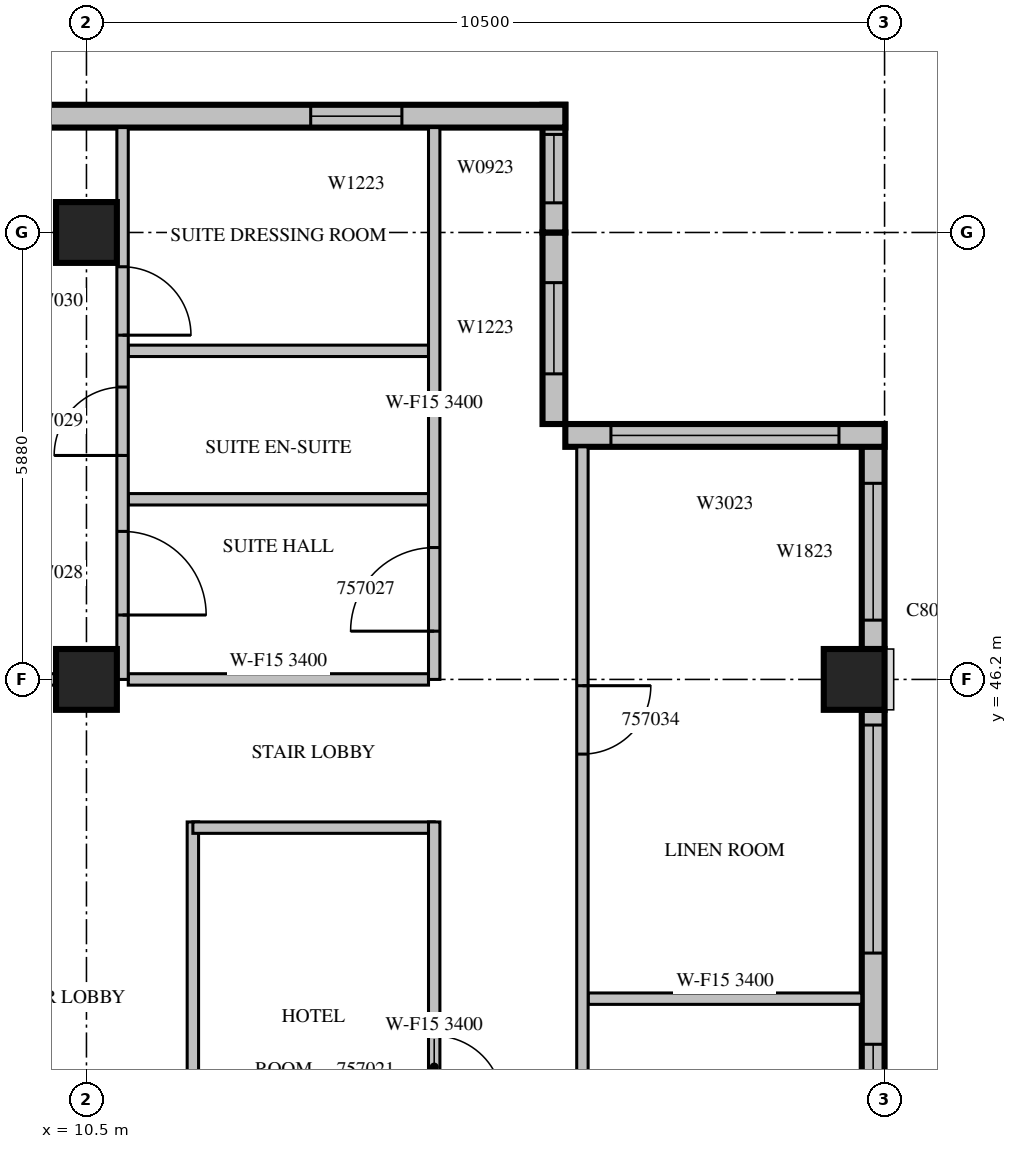
"""IFC4 building model, lengths in metres.
Left out: names, types, materials, properties, quantities, classifications, styles, units other than length and angle.
Written with IfcOpenShell. Run it as: python <this file> out.ifc"""

import sys

from ifc_helpers import new_model, si_unit, direction, frame, frame_2d, origin, origin_2d, place, context, subcontext, project, spatial, rectangle, extrude, source, transform, mapped, element, fill, save


model = new_model("IFC4")
c1 = context("Model", 3, precision=1e-05, world=origin(), true_north=direction((0.0, 1.0)))
c2 = subcontext(c1, "Body", "Model", "MODEL_VIEW")
j1 = project(units=[si_unit("LENGTHUNIT", "METRE"), si_unit("PLANEANGLEUNIT", "RADIAN")], contexts=[c1])
p1 = place(None, origin())
s1 = spatial("IfcSite", under=j1, at=p1, CompositionType="ELEMENT")
p2 = place(p1, origin())
s2 = spatial("IfcBuilding", under=s1, at=p2, CompositionType="ELEMENT")
p3 = place(p2, frame((0.0, 0.0, 250.0)))
s3 = spatial("IfcBuildingStorey", under=s2, at=p3, CompositionType="ELEMENT", Elevation=250.0)
m1 = source(origin(), c2, "Body", "SweptSolid", [
    extrude(rectangle(XDim=0.8, YDim=0.8, at=origin_2d()), origin(), (0.0, 0.0, 1.0), 3.8),
])
for number, where, z_axis, x_axis in (
    (1, (10.5, 46.2, 0.0), (0.0, 0.0, 1.0), (1.0, 0.0, 0.0)),
    (2, (20.6, 46.2, 0.0), (0.0, 0.0, 1.0), (1.0, 0.0, 0.0)),
    (3, (10.5, 52.08, 0.0), (0.0, 0.0, 1.0), (1.0, 0.0, 0.0)),
):
    element("IfcColumn", number, at=place(p3, frame(where, z_axis=z_axis, x_axis=x_axis)), inside=s3, PredefinedType="COLUMN", context=c2, shape_type="MappedRepresentation", body=[
        mapped(m1, transform((0.0, 0.0, 0.0), scale=1.0)),
    ])
m2 = source(origin(), c2, "Body", "SweptSolid", [
    extrude(rectangle(XDim=7.6, YDim=0.3, at=frame_2d((3.8, 0.0))), origin(), (0.0, 0.0, 1.0), 3.4),
])
p4 = place(p3, frame((20.85, 38.2, 0.0), z_axis=(0.0, 0.0, 1.0), x_axis=(0.0, 1.0, 0.0)))
e4 = element("IfcWall", 4, at=p4, inside=s3, PredefinedType="STANDARD", context=c2, shape_type="MappedRepresentation", body=[
    mapped(m2, transform((0.0, 0.0, 0.0), scale=1.0)),
])
m3 = source(origin(), c2, "Body", "SweptSolid", [
    extrude(rectangle(XDim=3.0, YDim=2.3, at=frame_2d((1.5, 1.15))), frame((0.0, 0.16, 0.0), z_axis=(0.0, -1.0, 0.0), x_axis=(1.0, 0.0, 0.0)), (0.0, 0.0, 1.0), 0.32),
])
p5 = place(p4, frame((0.2, 0.0, 0.6)))
e5 = element("IfcOpeningElement", 5, at=p5, cuts=e4, PredefinedType="OPENING", context=c2, shape_type="MappedRepresentation", body=[
    mapped(m3, transform((0.0, 0.0, 0.0), scale=1.0)),
])
p6 = place(p4, frame((4.4, 0.0, 0.6)))
e6 = element("IfcOpeningElement", 6, at=p6, cuts=e4, PredefinedType="OPENING", context=c2, shape_type="MappedRepresentation", body=[
    mapped(m3, transform((0.0, 0.0, 0.0), scale=1.0)),
])
m4 = source(origin(), c2, "Body", "SweptSolid", [
    extrude(rectangle(XDim=2.96, YDim=0.3, at=frame_2d((1.48, 0.0))), origin(), (0.0, 0.0, 1.0), 3.4),
])
p7 = place(p3, frame((20.85, 46.6, 0.0), z_axis=(0.0, 0.0, 1.0), x_axis=(0.0, 1.0, 0.0)))
e7 = element("IfcWall", 7, at=p7, inside=s3, PredefinedType="STANDARD", context=c2, shape_type="MappedRepresentation", body=[
    mapped(m4, transform((0.0, 0.0, 0.0), scale=1.0)),
])
m5 = source(origin(), c2, "Body", "SweptSolid", [
    extrude(rectangle(XDim=1.8, YDim=2.3, at=frame_2d((0.9, 1.15))), frame((0.0, 0.16, 0.0), z_axis=(0.0, -1.0, 0.0), x_axis=(1.0, 0.0, 0.0)), (0.0, 0.0, 1.0), 0.32),
])
p8 = place(p7, frame((0.38, 0.0, 0.6)))
e8 = element("IfcOpeningElement", 8, at=p8, cuts=e7, PredefinedType="OPENING", context=c2, shape_type="MappedRepresentation", body=[
    mapped(m5, transform((0.0, 0.0, 0.0), scale=1.0)),
])
m6 = source(origin(), c2, "Body", "SweptSolid", [
    extrude(rectangle(XDim=4.2, YDim=0.3, at=frame_2d((2.1, 0.0))), origin(), (0.0, 0.0, 1.0), 3.4),
])
p9 = place(p3, frame((21.0, 49.41, 0.0), z_axis=(0.0, 0.0, 1.0), x_axis=(-1.0, 0.0, 0.0)))
e9 = element("IfcWall", 9, at=p9, inside=s3, PredefinedType="STANDARD", context=c2, shape_type="MappedRepresentation", body=[
    mapped(m6, transform((0.0, 0.0, 0.0), scale=1.0)),
])
p10 = place(p9, frame((0.6, 0.0, 0.6)))
e10 = element("IfcOpeningElement", 10, at=p10, cuts=e9, PredefinedType="OPENING", context=c2, shape_type="MappedRepresentation", body=[
    mapped(m3, transform((0.0, 0.0, 0.0), scale=1.0)),
])
m7 = source(origin(), c2, "Body", "SweptSolid", [
    extrude(rectangle(XDim=2.52, YDim=0.3, at=frame_2d((1.26, 0.0))), origin(), (0.0, 0.0, 1.0), 3.4),
])
p11 = place(p3, frame((16.65, 49.56, 0.0), z_axis=(0.0, 0.0, 1.0), x_axis=(0.0, 1.0, 0.0)))
e11 = element("IfcWall", 11, at=p11, inside=s3, PredefinedType="STANDARD", context=c2, shape_type="MappedRepresentation", body=[
    mapped(m7, transform((0.0, 0.0, 0.0), scale=1.0)),
])
m8 = source(origin(), c2, "Body", "SweptSolid", [
    extrude(rectangle(XDim=1.2, YDim=2.3, at=frame_2d((0.6, 1.15))), frame((0.0, 0.16, 0.0), z_axis=(0.0, -1.0, 0.0), x_axis=(1.0, 0.0, 0.0)), (0.0, 0.0, 1.0), 0.32),
])
p12 = place(p11, frame((0.66, 0.0, 0.6)))
e12 = element("IfcOpeningElement", 12, at=p12, cuts=e11, PredefinedType="OPENING", context=c2, shape_type="MappedRepresentation", body=[
    mapped(m8, transform((0.0, 0.0, 0.0), scale=1.0)),
])
m9 = source(origin(), c2, "Body", "SweptSolid", [
    extrude(rectangle(XDim=1.68, YDim=0.3, at=frame_2d((0.84, 0.0))), origin(), (0.0, 0.0, 1.0), 3.4),
])
p13 = place(p3, frame((16.65, 52.08, 0.0), z_axis=(0.0, 0.0, 1.0), x_axis=(0.0, 1.0, 0.0)))
e13 = element("IfcWall", 13, at=p13, inside=s3, PredefinedType="STANDARD", context=c2, shape_type="MappedRepresentation", body=[
    mapped(m9, transform((0.0, 0.0, 0.0), scale=1.0)),
])
m10 = source(origin(), c2, "Body", "SweptSolid", [
    extrude(rectangle(XDim=0.9, YDim=2.3, at=frame_2d((0.45, 1.15))), frame((0.0, 0.16, 0.0), z_axis=(0.0, -1.0, 0.0), x_axis=(1.0, 0.0, 0.0)), (0.0, 0.0, 1.0), 0.32),
])
p14 = place(p13, frame((0.39, 0.0, 0.6)))
e14 = element("IfcOpeningElement", 14, at=p14, cuts=e13, PredefinedType="OPENING", context=c2, shape_type="MappedRepresentation", body=[
    mapped(m10, transform((0.0, 0.0, 0.0), scale=1.0)),
])
m11 = source(origin(), c2, "Body", "SweptSolid", [
    extrude(rectangle(XDim=10.5, YDim=0.3, at=frame_2d((5.25, 0.0))), origin(), (0.0, 0.0, 1.0), 3.4),
])
p15 = place(p3, frame((16.8, 53.61, 0.0), z_axis=(0.0, 0.0, 1.0), x_axis=(-1.0, 0.0, 0.0)))
e15 = element("IfcWall", 15, at=p15, inside=s3, PredefinedType="STANDARD", context=c2, shape_type="MappedRepresentation", body=[
    mapped(m11, transform((0.0, 0.0, 0.0), scale=1.0)),
])
p16 = place(p15, frame((2.15, 0.0, 0.6)))
e16 = element("IfcOpeningElement", 16, at=p16, cuts=e15, PredefinedType="OPENING", context=c2, shape_type="MappedRepresentation", body=[
    mapped(m8, transform((0.0, 0.0, 0.0), scale=1.0)),
])
p17 = place(p15, frame((8.025, 0.0, 0.6)))
e17 = element("IfcOpeningElement", 17, at=p17, cuts=e15, PredefinedType="OPENING", context=c2, shape_type="MappedRepresentation", body=[
    mapped(m5, transform((0.0, 0.0, 0.0), scale=1.0)),
])
m12 = source(origin(), c2, "Body", "SweptSolid", [
    extrude(rectangle(XDim=6.45, YDim=0.15, at=frame_2d((3.225, 0.0))), origin(), (0.0, 0.0, 1.0), 3.4),
])
p18 = place(p3, frame((11.9, 44.325, 0.0), z_axis=(0.0, 0.0, 1.0), x_axis=(0.0, -1.0, 0.0)))
e18 = element("IfcWall", 18, at=p18, inside=s3, PredefinedType="PARTITIONING", context=c2, shape_type="MappedRepresentation", body=[
    mapped(m12, transform((0.0, 0.0, 0.0), scale=1.0)),
])
m13 = source(origin(), c2, "Body", "SweptSolid", [
    extrude(rectangle(XDim=3.175, YDim=0.15, at=frame_2d((1.587, 0.0))), origin(), (0.0, 0.0, 1.0), 3.4),
])
p19 = place(p3, frame((15.075, 44.25, 0.0), z_axis=(0.0, 0.0, 1.0), x_axis=(-1.0, 0.0, 0.0)))
e19 = element("IfcWall", 19, at=p19, inside=s3, PredefinedType="PARTITIONING", context=c2, shape_type="MappedRepresentation", body=[
    mapped(m13, transform((0.0, 0.0, 0.0), scale=1.0)),
])
p20 = place(p3, frame((15.075, 37.875, 0.0), z_axis=(0.0, 0.0, 1.0), x_axis=(0.0, 1.0, 0.0)))
e20 = element("IfcWall", 20, at=p20, inside=s3, PredefinedType="PARTITIONING", context=c2, shape_type="MappedRepresentation", body=[
    mapped(m12, transform((0.0, 0.0, 0.0), scale=1.0)),
])
m14 = source(origin(), c2, "Body", "SweptSolid", [
    extrude(rectangle(XDim=0.9, YDim=2.1, at=frame_2d((0.45, 1.05))), frame((0.0, 0.085, 0.0), z_axis=(0.0, -1.0, 0.0), x_axis=(1.0, 0.0, 0.0)), (0.0, 0.0, 1.0), 0.17),
])
p21 = place(p20, frame((2.737, 0.0, 0.0)))
e21 = element("IfcOpeningElement", 21, at=p21, cuts=e20, PredefinedType="OPENING", context=c2, shape_type="MappedRepresentation", body=[
    mapped(m14, transform((0.0, 0.0, 0.0), scale=1.0)),
])
m15 = source(origin(), c2, "Body", "SweptSolid", [
    extrude(rectangle(XDim=3.95, YDim=0.15, at=frame_2d((1.975, 0.0))), origin(), (0.0, 0.0, 1.0), 3.4),
])
for number, where, z_axis, x_axis in (
    (22, (15.0, 48.57, 0.0), (0.0, 0.0, 1.0), (-1.0, 0.0, 0.0)),
    (23, (15.0, 50.523, 0.0), (0.0, 0.0, 1.0), (-1.0, 0.0, 0.0)),
):
    element("IfcWall", number, at=place(p3, frame(where, z_axis=z_axis, x_axis=x_axis)), inside=s3, PredefinedType="PARTITIONING", context=c2, shape_type="MappedRepresentation", body=[
        mapped(m15, transform((0.0, 0.0, 0.0), scale=1.0)),
    ])
m16 = source(origin(), c2, "Body", "SweptSolid", [
    extrude(rectangle(XDim=3.596, YDim=0.15, at=frame_2d((1.798, 0.0))), origin(), (0.0, 0.0, 1.0), 3.4),
])
p22 = place(p3, frame((10.101, 46.2, 0.0), z_axis=(0.0, 0.0, 1.0), x_axis=(-1.0, 0.0, 0.0)))
e24 = element("IfcWall", 24, at=p22, inside=s3, PredefinedType="PARTITIONING", context=c2, shape_type="MappedRepresentation", body=[
    mapped(m16, transform((0.0, 0.0, 0.0), scale=1.0)),
])
p23 = place(p3, frame((15.0, 46.2, 0.0), z_axis=(0.0, 0.0, 1.0), x_axis=(-1.0, 0.0, 0.0)))
e25 = element("IfcWall", 25, at=p23, inside=s3, PredefinedType="PARTITIONING", context=c2, shape_type="MappedRepresentation", body=[
    mapped(m15, transform((0.0, 0.0, 0.0), scale=1.0)),
])
m17 = source(origin(), c2, "Body", "SweptSolid", [
    extrude(rectangle(XDim=7.26, YDim=0.15, at=frame_2d((3.63, 0.0))), origin(), (0.0, 0.0, 1.0), 3.4),
])
p24 = place(p3, frame((10.975, 46.2, 0.0), z_axis=(0.0, 0.0, 1.0), x_axis=(0.0, 1.0, 0.0)))
e26 = element("IfcWall", 26, at=p24, inside=s3, PredefinedType="PARTITIONING", context=c2, shape_type="MappedRepresentation", body=[
    mapped(m17, transform((0.0, 0.0, 0.0), scale=1.0)),
])
m18 = source(origin(), c2, "Body", "SweptSolid", [
    extrude(rectangle(XDim=1.1, YDim=2.1, at=frame_2d((0.55, 1.05))), frame((0.0, 0.085, 0.0), z_axis=(0.0, -1.0, 0.0), x_axis=(1.0, 0.0, 0.0)), (0.0, 0.0, 1.0), 0.17),
])
p25 = place(p24, frame((0.847, 0.0, 0.0)))
e27 = element("IfcOpeningElement", 27, at=p25, cuts=e26, PredefinedType="OPENING", context=c2, shape_type="MappedRepresentation", body=[
    mapped(m18, transform((0.0, 0.0, 0.0), scale=1.0)),
])
p26 = place(p24, frame((2.946, 0.0, 0.0)))
e28 = element("IfcOpeningElement", 28, at=p26, cuts=e26, PredefinedType="OPENING", context=c2, shape_type="MappedRepresentation", body=[
    mapped(m14, transform((0.0, 0.0, 0.0), scale=1.0)),
])
p27 = place(p24, frame((4.529, 0.0, 0.0)))
e29 = element("IfcOpeningElement", 29, at=p27, cuts=e26, PredefinedType="OPENING", context=c2, shape_type="MappedRepresentation", body=[
    mapped(m14, transform((0.0, 0.0, 0.0), scale=1.0)),
])
m19 = source(origin(), c2, "Body", "SweptSolid", [
    extrude(rectangle(XDim=3.6, YDim=0.15, at=frame_2d((1.8, 0.0))), origin(), (0.0, 0.0, 1.0), 3.4),
])
p28 = place(p3, frame((20.7, 42.0, 0.0), z_axis=(0.0, 0.0, 1.0), x_axis=(-1.0, 0.0, 0.0)))
e30 = element("IfcWall", 30, at=p28, inside=s3, PredefinedType="PARTITIONING", context=c2, shape_type="MappedRepresentation", body=[
    mapped(m19, transform((0.0, 0.0, 0.0), scale=1.0)),
])
p29 = place(p3, frame((15.075, 46.2, 0.0), z_axis=(0.0, 0.0, 1.0), x_axis=(0.0, 1.0, 0.0)))
e31 = element("IfcWall", 31, at=p29, inside=s3, PredefinedType="PARTITIONING", context=c2, shape_type="MappedRepresentation", body=[
    mapped(m17, transform((0.0, 0.0, 0.0), scale=1.0)),
])
p30 = place(p29, frame((0.635, 0.0, 0.0)))
e32 = element("IfcOpeningElement", 32, at=p30, cuts=e31, PredefinedType="OPENING", context=c2, shape_type="MappedRepresentation", body=[
    mapped(m18, transform((0.0, 0.0, 0.0), scale=1.0)),
])
m20 = source(origin(), c2, "Body", "SweptSolid", [
    extrude(rectangle(XDim=19.86, YDim=0.15, at=frame_2d((9.93, 0.0))), origin(), (0.0, 0.0, 1.0), 2.9),
])
p31 = place(p3, frame((17.025, 49.26, 0.0), z_axis=(0.0, 0.0, 1.0), x_axis=(0.0, -1.0, 0.0)))
e33 = element("IfcWall", 33, at=p31, inside=s3, PredefinedType="PARTITIONING", context=c2, shape_type="MappedRepresentation", body=[
    mapped(m20, transform((0.0, 0.0, 0.0), scale=1.0)),
])
p32 = place(p31, frame((18.528, 0.0, 0.0)))
e34 = element("IfcOpeningElement", 34, at=p32, cuts=e33, PredefinedType="OPENING", context=c2, shape_type="MappedRepresentation", body=[
    mapped(m14, transform((0.0, 0.0, 0.0), scale=1.0)),
])
p33 = place(p31, frame((16.428, 0.0, 0.0)))
e35 = element("IfcOpeningElement", 35, at=p33, cuts=e33, PredefinedType="OPENING", context=c2, shape_type="MappedRepresentation", body=[
    mapped(m14, transform((0.0, 0.0, 0.0), scale=1.0)),
])
m21 = source(origin(), c2, "Body", "SweptSolid", [
    extrude(rectangle(XDim=1.2, YDim=2.1, at=frame_2d((0.6, 1.05))), frame((0.0, 0.085, 0.0), z_axis=(0.0, -1.0, 0.0), x_axis=(1.0, 0.0, 0.0)), (0.0, 0.0, 1.0), 0.17),
])
p34 = place(p31, frame((10.86, 0.0, 0.0)))
e36 = element("IfcOpeningElement", 36, at=p34, cuts=e33, PredefinedType="OPENING", context=c2, shape_type="MappedRepresentation", body=[
    mapped(m21, transform((0.0, 0.0, 0.0), scale=1.0)),
])
p35 = place(p31, frame((3.143, 0.0, 0.0)))
e37 = element("IfcOpeningElement", 37, at=p35, cuts=e33, PredefinedType="OPENING", context=c2, shape_type="MappedRepresentation", body=[
    mapped(m14, transform((0.0, 0.0, 0.0), scale=1.0)),
])
m22 = source(origin(), c2, "Body", "SweptSolid", [
    extrude(rectangle(XDim=3.0, YDim=2.3, at=frame_2d((1.5, 1.15))), frame((0.0, 0.03, 0.0), z_axis=(0.0, -1.0, 0.0), x_axis=(1.0, 0.0, 0.0)), (0.0, 0.0, 1.0), 0.06),
])
p36 = place(p5, origin())
e38 = element("IfcWindow", 38, at=p36, inside=s3, PartitioningType="SINGLE_PANEL", PredefinedType="WINDOW", context=c2, shape_type="MappedRepresentation", body=[
    mapped(m22, transform((0.0, 0.0, 0.0), scale=1.0)),
])
fill(e5, e38)
p37 = place(p6, origin())
e39 = element("IfcWindow", 39, at=p37, inside=s3, PartitioningType="SINGLE_PANEL", PredefinedType="WINDOW", context=c2, shape_type="MappedRepresentation", body=[
    mapped(m22, transform((0.0, 0.0, 0.0), scale=1.0)),
])
fill(e6, e39)
m23 = source(origin(), c2, "Body", "SweptSolid", [
    extrude(rectangle(XDim=1.8, YDim=2.3, at=frame_2d((0.9, 1.15))), frame((0.0, 0.03, 0.0), z_axis=(0.0, -1.0, 0.0), x_axis=(1.0, 0.0, 0.0)), (0.0, 0.0, 1.0), 0.06),
])
p38 = place(p8, origin())
e40 = element("IfcWindow", 40, at=p38, inside=s3, PartitioningType="SINGLE_PANEL", PredefinedType="WINDOW", context=c2, shape_type="MappedRepresentation", body=[
    mapped(m23, transform((0.0, 0.0, 0.0), scale=1.0)),
])
fill(e8, e40)
p39 = place(p10, origin())
e41 = element("IfcWindow", 41, at=p39, inside=s3, PartitioningType="SINGLE_PANEL", PredefinedType="WINDOW", context=c2, shape_type="MappedRepresentation", body=[
    mapped(m22, transform((0.0, 0.0, 0.0), scale=1.0)),
])
fill(e10, e41)
m24 = source(origin(), c2, "Body", "SweptSolid", [
    extrude(rectangle(XDim=1.2, YDim=2.3, at=frame_2d((0.6, 1.15))), frame((0.0, 0.03, 0.0), z_axis=(0.0, -1.0, 0.0), x_axis=(1.0, 0.0, 0.0)), (0.0, 0.0, 1.0), 0.06),
])
p40 = place(p12, origin())
e42 = element("IfcWindow", 42, at=p40, inside=s3, PartitioningType="SINGLE_PANEL", PredefinedType="WINDOW", context=c2, shape_type="MappedRepresentation", body=[
    mapped(m24, transform((0.0, 0.0, 0.0), scale=1.0)),
])
fill(e12, e42)
m25 = source(origin(), c2, "Body", "SweptSolid", [
    extrude(rectangle(XDim=0.9, YDim=2.3, at=frame_2d((0.45, 1.15))), frame((0.0, 0.03, 0.0), z_axis=(0.0, -1.0, 0.0), x_axis=(1.0, 0.0, 0.0)), (0.0, 0.0, 1.0), 0.06),
])
p41 = place(p14, origin())
e43 = element("IfcWindow", 43, at=p41, inside=s3, PartitioningType="SINGLE_PANEL", PredefinedType="WINDOW", context=c2, shape_type="MappedRepresentation", body=[
    mapped(m25, transform((0.0, 0.0, 0.0), scale=1.0)),
])
fill(e14, e43)
p42 = place(p16, origin())
e44 = element("IfcWindow", 44, at=p42, inside=s3, PartitioningType="SINGLE_PANEL", PredefinedType="WINDOW", context=c2, shape_type="MappedRepresentation", body=[
    mapped(m24, transform((0.0, 0.0, 0.0), scale=1.0)),
])
fill(e16, e44)
m26 = source(origin(), c2, "Body", "SweptSolid", [
    extrude(rectangle(XDim=0.9, YDim=2.1, at=frame_2d((0.45, 1.05))), frame((0.0, 0.025, 0.0), z_axis=(0.0, -1.0, 0.0), x_axis=(1.0, 0.0, 0.0)), (0.0, 0.0, 1.0), 0.05),
])
p43 = place(p21, origin())
e45 = element("IfcDoor", 45, at=p43, inside=s3, OperationType="SINGLE_SWING_RIGHT", PredefinedType="DOOR", context=c2, shape_type="MappedRepresentation", body=[
    mapped(m26, transform((0.0, 0.0, 0.0), scale=1.0)),
])
fill(e21, e45)
m27 = source(origin(), c2, "Body", "SweptSolid", [
    extrude(rectangle(XDim=1.1, YDim=2.1, at=frame_2d((0.55, 1.05))), frame((0.0, 0.025, 0.0), z_axis=(0.0, -1.0, 0.0), x_axis=(1.0, 0.0, 0.0)), (0.0, 0.0, 1.0), 0.05),
])
p44 = place(p30, origin())
e46 = element("IfcDoor", 46, at=p44, inside=s3, OperationType="SINGLE_SWING_LEFT", PredefinedType="DOOR", context=c2, shape_type="MappedRepresentation", body=[
    mapped(m27, transform((0.0, 0.0, 0.0), scale=1.0)),
])
fill(e32, e46)
p45 = place(p25, origin())
e47 = element("IfcDoor", 47, at=p45, inside=s3, OperationType="SINGLE_SWING_RIGHT", PredefinedType="DOOR", context=c2, shape_type="MappedRepresentation", body=[
    mapped(m27, transform((0.0, 0.0, 0.0), scale=1.0)),
])
fill(e27, e47)
p46 = place(p26, origin())
e48 = element("IfcDoor", 48, at=p46, inside=s3, OperationType="SINGLE_SWING_LEFT", PredefinedType="DOOR", context=c2, shape_type="MappedRepresentation", body=[
    mapped(m26, transform((0.0, 0.0, 0.0), scale=1.0)),
])
fill(e28, e48)
p47 = place(p27, origin())
e49 = element("IfcDoor", 49, at=p47, inside=s3, OperationType="SINGLE_SWING_RIGHT", PredefinedType="DOOR", context=c2, shape_type="MappedRepresentation", body=[
    mapped(m26, transform((0.0, 0.0, 0.0), scale=1.0)),
])
fill(e29, e49)
p48 = place(p35, origin())
e50 = element("IfcDoor", 50, at=p48, inside=s3, OperationType="SINGLE_SWING_LEFT", PredefinedType="DOOR", context=c2, shape_type="MappedRepresentation", body=[
    mapped(m26, transform((0.0, 0.0, 0.0), scale=1.0)),
])
fill(e37, e50)
save(model, sys.argv[1])
